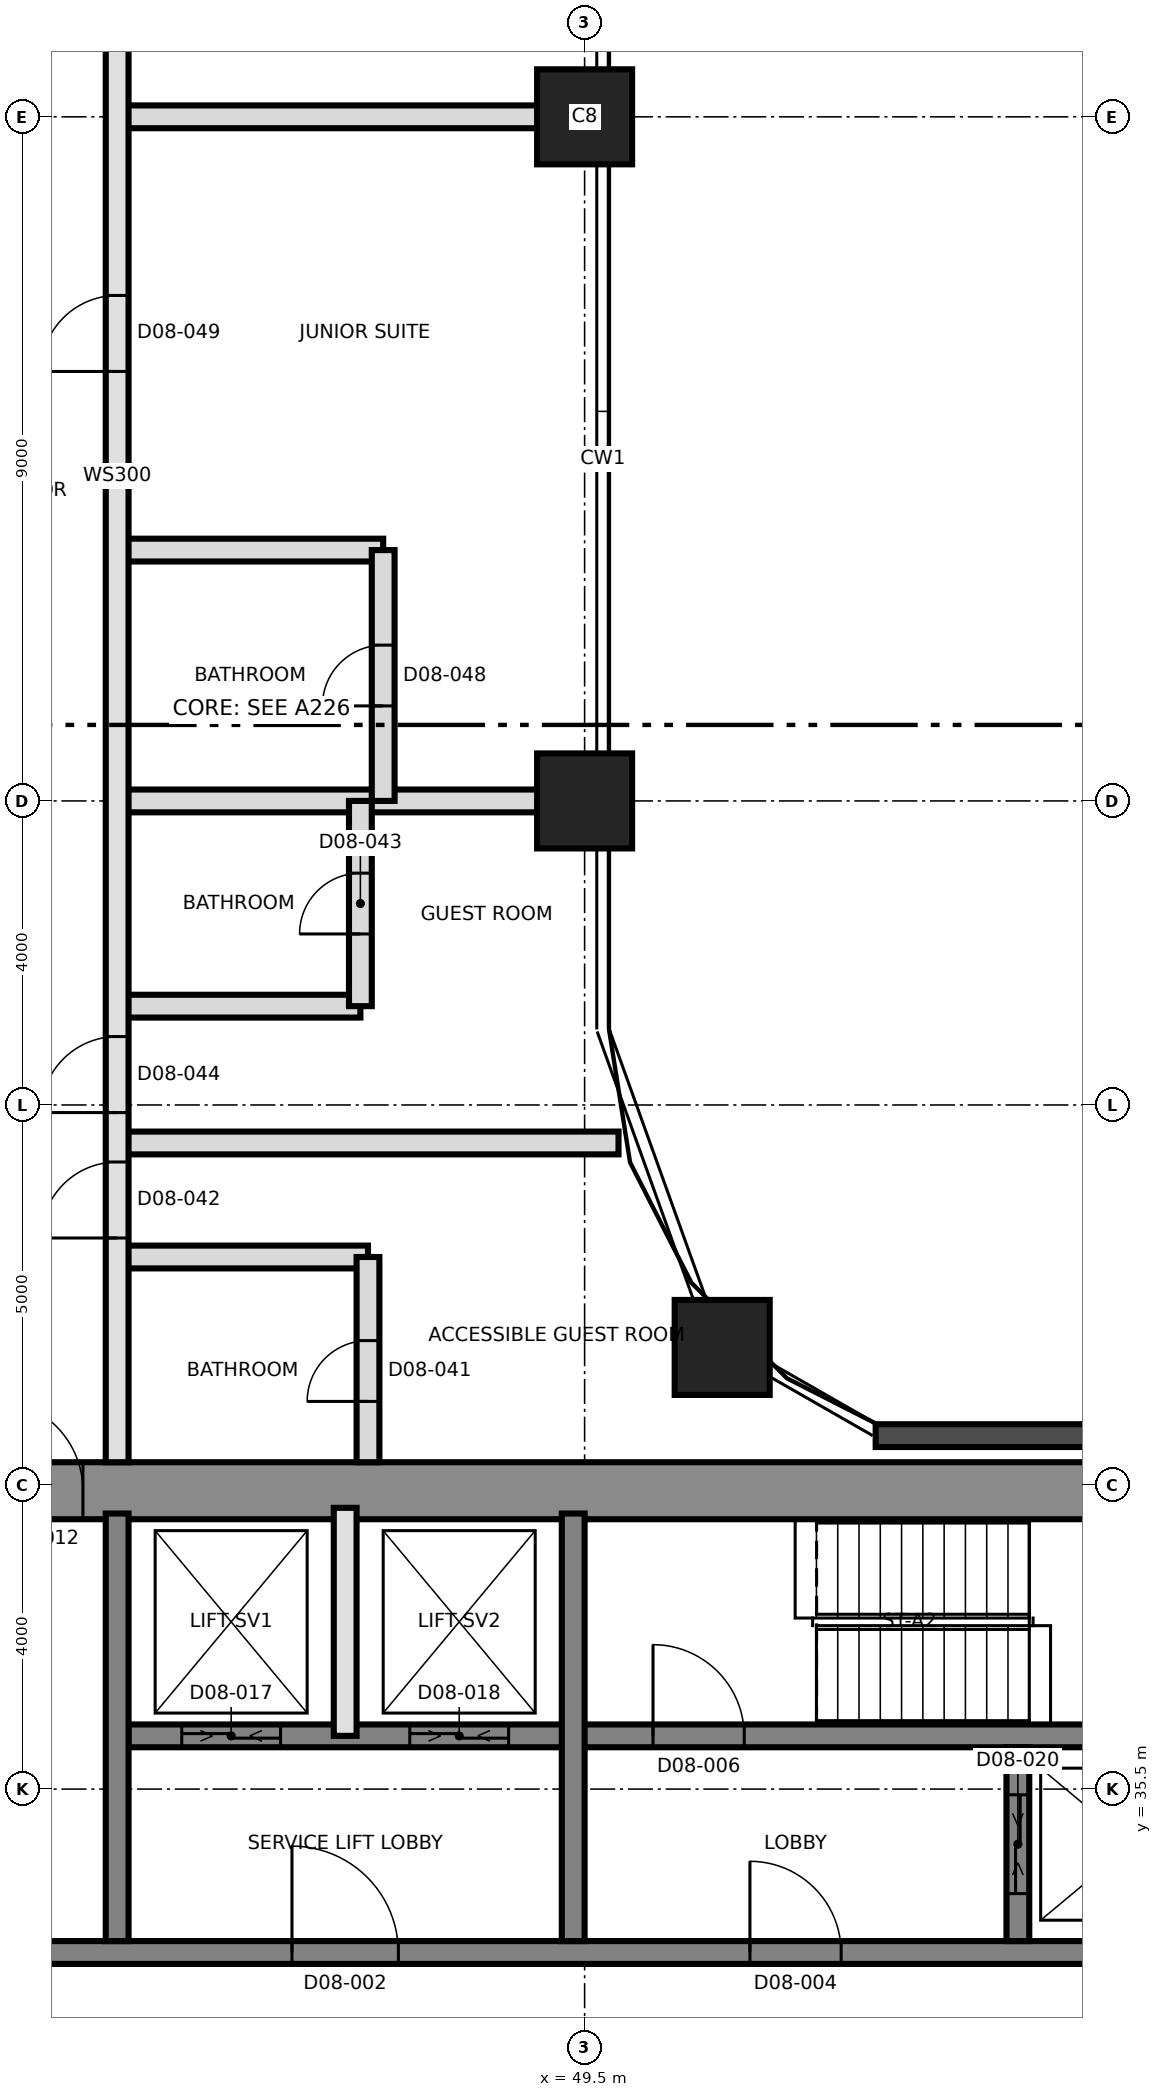
"""IFC4 building model, lengths in metres.
Left out: names, types, materials, properties, quantities, classifications, styles, units other than length and angle.
Written with IfcOpenShell. Run it as: python <this file> out.ifc"""

import sys

from ifc_helpers import new_model, si_unit, direction, frame, frame_2d, origin, origin_2d, place, context, subcontext, project, spatial, rectangle, extrude, element, fill, save


model = new_model("IFC4")
c1 = context("Model", 3, precision=1e-05, world=origin(), true_north=direction((0.0, 1.0)))
c2 = subcontext(c1, "Body", "Model", "MODEL_VIEW")
j1 = project(units=[si_unit("LENGTHUNIT", "METRE"), si_unit("PLANEANGLEUNIT", "RADIAN")], contexts=[c1])
p1 = place(None, origin())
s1 = spatial("IfcSite", under=j1, at=p1, CompositionType="ELEMENT")
p2 = place(p1, origin())
s2 = spatial("IfcBuilding", under=s1, at=p2, CompositionType="ELEMENT")
p3 = place(p2, frame((0.0, 0.0, 98.2)))
s3 = spatial("IfcBuildingStorey", under=s2, at=p3, CompositionType="ELEMENT", Elevation=98.2)
p4 = place(p3, frame((31.125, 39.425, 0.0), z_axis=(0.0, 0.0, 1.0), x_axis=(1.0, 0.0, 0.0)))
e1 = element("IfcWall", 1, at=p4, inside=s3, PredefinedType="SHEAR", context=c2, shape_type="SweptSolid", body=[
    extrude(rectangle(XDim=27.0, YDim=0.75, at=frame_2d((13.5, 0.0))), origin(), (0.0, 0.0, 1.0), 3.7),
])
p5 = place(p4, frame((10.575, 0.0, 0.0)))
e2 = element("IfcOpeningElement", 2, at=p5, cuts=e1, PredefinedType="OPENING", context=c2, shape_type="SweptSolid", body=[
    extrude(rectangle(XDim=1.2, YDim=2.1, at=frame_2d((0.6, 1.05))), frame((0.0, 0.385, 0.0), z_axis=(0.0, -1.0, 0.0), x_axis=(1.0, 0.0, 0.0)), (0.0, 0.0, 1.0), 0.77),
])
p6 = place(p3, frame((31.875, 33.35, 0.0), z_axis=(0.0, 0.0, 1.0), x_axis=(1.0, 0.0, 0.0)))
e3 = element("IfcWall", 3, at=p6, inside=s3, PredefinedType="SHEAR", context=c2, shape_type="SweptSolid", body=[
    extrude(rectangle(XDim=26.25, YDim=0.3, at=frame_2d((13.125, 0.0))), origin(), (0.0, 0.0, 1.0), 3.7),
])
p7 = place(p6, frame((13.775, 0.0, 0.0)))
e4 = element("IfcOpeningElement", 4, at=p7, cuts=e3, PredefinedType="OPENING", context=c2, shape_type="SweptSolid", body=[
    extrude(rectangle(XDim=1.4, YDim=2.1, at=frame_2d((0.7, 1.05))), frame((0.0, 0.16, 0.0), z_axis=(0.0, -1.0, 0.0), x_axis=(1.0, 0.0, 0.0)), (0.0, 0.0, 1.0), 0.32),
])
p8 = place(p6, frame((5.25, 0.0, 0.0)))
e5 = element("IfcOpeningElement", 5, at=p8, cuts=e3, PredefinedType="OPENING", context=c2, shape_type="SweptSolid", body=[
    extrude(rectangle(XDim=1.2, YDim=2.1, at=frame_2d((0.6, 1.05))), frame((0.0, 0.16, 0.0), z_axis=(0.0, -1.0, 0.0), x_axis=(1.0, 0.0, 0.0)), (0.0, 0.0, 1.0), 0.32),
])
p9 = place(p6, frame((19.8, 0.0, 0.0)))
e6 = element("IfcOpeningElement", 6, at=p9, cuts=e3, PredefinedType="OPENING", context=c2, shape_type="SweptSolid", body=[
    extrude(rectangle(XDim=1.2, YDim=2.1, at=frame_2d((0.6, 1.05))), frame((0.0, 0.16, 0.0), z_axis=(0.0, -1.0, 0.0), x_axis=(1.0, 0.0, 0.0)), (0.0, 0.0, 1.0), 0.32),
])
p10 = place(p3, frame((43.5, 36.2, 0.0), z_axis=(0.0, 0.0, 1.0), x_axis=(1.0, 0.0, 0.0)))
e7 = element("IfcWall", 7, at=p10, inside=s3, PredefinedType="SHEAR", context=c2, shape_type="SweptSolid", body=[
    extrude(rectangle(XDim=14.625, YDim=0.3, at=frame_2d((7.312, 0.0))), origin(), (0.0, 0.0, 1.0), 3.7),
])
p11 = place(p10, frame((6.9, 0.0, 0.0)))
e8 = element("IfcOpeningElement", 8, at=p11, cuts=e7, PredefinedType="OPENING", context=c2, shape_type="SweptSolid", body=[
    extrude(rectangle(XDim=1.2, YDim=2.1, at=frame_2d((0.6, 1.05))), frame((0.0, 0.16, 0.0), z_axis=(0.0, -1.0, 0.0), x_axis=(1.0, 0.0, 0.0)), (0.0, 0.0, 1.0), 0.32),
])
p12 = place(p10, frame((0.7, 0.0, 0.0)))
e9 = element("IfcOpeningElement", 9, at=p12, cuts=e7, PredefinedType="OPENING", context=c2, shape_type="SweptSolid", body=[
    extrude(rectangle(XDim=1.3, YDim=2.4, at=frame_2d((0.65, 1.2))), frame((0.0, 0.16, 0.0), z_axis=(0.0, -1.0, 0.0), x_axis=(1.0, 0.0, 0.0)), (0.0, 0.0, 1.0), 0.32),
])
p13 = place(p10, frame((3.7, 0.0, 0.0)))
e10 = element("IfcOpeningElement", 10, at=p13, cuts=e7, PredefinedType="OPENING", context=c2, shape_type="SweptSolid", body=[
    extrude(rectangle(XDim=1.3, YDim=2.4, at=frame_2d((0.65, 1.2))), frame((0.0, 0.16, 0.0), z_axis=(0.0, -1.0, 0.0), x_axis=(1.0, 0.0, 0.0)), (0.0, 0.0, 1.0), 0.32),
])
for number, where, z_axis, x_axis in (
    (11, (43.35, 33.5, 0.0), (0.0, 0.0, 1.0), (0.0, 1.0, 0.0)),
    (12, (49.35, 33.5, 0.0), (0.0, 0.0, 1.0), (0.0, 1.0, 0.0)),
):
    element("IfcWall", number, at=place(p3, frame(where, z_axis=z_axis, x_axis=x_axis)), inside=s3, PredefinedType="SHEAR", context=c2, shape_type="SweptSolid", body=[
        extrude(rectangle(XDim=5.625, YDim=0.3, at=frame_2d((2.812, 0.0))), origin(), (0.0, 0.0, 1.0), 3.7),
    ])
p14 = place(p3, frame((55.2, 33.5, 0.0), z_axis=(0.0, 0.0, 1.0), x_axis=(0.0, 1.0, 0.0)))
e13 = element("IfcWall", 13, at=p14, inside=s3, PredefinedType="SHEAR", context=c2, shape_type="SweptSolid", body=[
    extrude(rectangle(XDim=2.55, YDim=0.3, at=frame_2d((1.275, 0.0))), origin(), (0.0, 0.0, 1.0), 3.7),
])
p15 = place(p14, frame((0.625, 0.0, 0.0)))
e14 = element("IfcOpeningElement", 14, at=p15, cuts=e13, PredefinedType="OPENING", context=c2, shape_type="SweptSolid", body=[
    extrude(rectangle(XDim=1.3, YDim=2.4, at=frame_2d((0.65, 1.2))), frame((0.0, 0.16, 0.0), z_axis=(0.0, -1.0, 0.0), x_axis=(1.0, 0.0, 0.0)), (0.0, 0.0, 1.0), 0.32),
])
for number, where, z_axis, x_axis in (
    (15, (51.31, 41.31, 0.0), (0.0, 0.0, 1.0), (1.0, 0.0, 0.0)),
    (16, (49.5, 48.5, 0.0), (0.0, 0.0, 1.0), (1.0, 0.0, 0.0)),
    (17, (49.5, 57.5, 0.0), (0.0, 0.0, 1.0), (1.0, 0.0, 0.0)),
):
    element("IfcColumn", number, at=place(p3, frame(where, z_axis=z_axis, x_axis=x_axis)), inside=s3, PredefinedType="COLUMN", context=c2, shape_type="SweptSolid", body=[
        extrude(rectangle(XDim=1.25, YDim=1.25, at=origin_2d()), origin(), (0.0, 0.0, 1.0), 3.7),
    ])
p16 = place(p3, frame((58.67, 40.15, 0.0), z_axis=(0.0, 0.0, 1.0), x_axis=(-1.0, 0.0, 0.0)))
e18 = element("IfcWall", 18, at=p16, inside=s3, PredefinedType="SOLIDWALL", context=c2, shape_type="SweptSolid", body=[
    extrude(rectangle(XDim=5.341, YDim=0.3, at=frame_2d((2.67, 0.0))), origin(), (0.0, 0.0, 1.0), 3.4),
])
p17 = place(p3, frame((46.35, 36.2, 0.0), z_axis=(0.0, 0.0, 1.0), x_axis=(0.0, 1.0, 0.0)))
e19 = element("IfcWall", 19, at=p17, inside=s3, PredefinedType="SOLIDWALL", context=c2, shape_type="SweptSolid", body=[
    extrude(rectangle(XDim=3.0, YDim=0.3, at=frame_2d((1.5, 0.0))), origin(), (0.0, 0.0, 1.0), 3.4),
])
p18 = place(p3, frame((43.35, 42.5, 0.0), z_axis=(0.0, 0.0, 1.0), x_axis=(1.0, 0.0, 0.0)))
e20 = element("IfcWall", 20, at=p18, inside=s3, PredefinedType="PARTITIONING", context=c2, shape_type="SweptSolid", body=[
    extrude(rectangle(XDim=3.3, YDim=0.3, at=frame_2d((1.65, 0.0))), origin(), (0.0, 0.0, 1.0), 3.4),
])
p19 = place(p3, frame((43.35, 44.0, 0.0), z_axis=(0.0, 0.0, 1.0), x_axis=(1.0, 0.0, 0.0)))
e21 = element("IfcWall", 21, at=p19, inside=s3, PredefinedType="PARTITIONING", context=c2, shape_type="SweptSolid", body=[
    extrude(rectangle(XDim=6.596, YDim=0.3, at=frame_2d((3.298, 0.0))), origin(), (0.0, 0.0, 1.0), 3.4),
])
p20 = place(p3, frame((43.35, 45.8, 0.0), z_axis=(0.0, 0.0, 1.0), x_axis=(1.0, 0.0, 0.0)))
e22 = element("IfcWall", 22, at=p20, inside=s3, PredefinedType="PARTITIONING", context=c2, shape_type="SweptSolid", body=[
    extrude(rectangle(XDim=3.2, YDim=0.3, at=frame_2d((1.6, 0.0))), origin(), (0.0, 0.0, 1.0), 3.4),
])
p21 = place(p3, frame((43.35, 48.5, 0.0), z_axis=(0.0, 0.0, 1.0), x_axis=(1.0, 0.0, 0.0)))
e23 = element("IfcWall", 23, at=p21, inside=s3, PredefinedType="PARTITIONING", context=c2, shape_type="SweptSolid", body=[
    extrude(rectangle(XDim=6.12, YDim=0.3, at=frame_2d((3.06, 0.0))), origin(), (0.0, 0.0, 1.0), 3.4),
])
p22 = place(p3, frame((43.35, 51.8, 0.0), z_axis=(0.0, 0.0, 1.0), x_axis=(1.0, 0.0, 0.0)))
e24 = element("IfcWall", 24, at=p22, inside=s3, PredefinedType="PARTITIONING", context=c2, shape_type="SweptSolid", body=[
    extrude(rectangle(XDim=3.5, YDim=0.3, at=frame_2d((1.75, 0.0))), origin(), (0.0, 0.0, 1.0), 3.4),
])
p23 = place(p3, frame((43.35, 57.5, 0.0), z_axis=(0.0, 0.0, 1.0), x_axis=(1.0, 0.0, 0.0)))
e25 = element("IfcWall", 25, at=p23, inside=s3, PredefinedType="PARTITIONING", context=c2, shape_type="SweptSolid", body=[
    extrude(rectangle(XDim=6.12, YDim=0.3, at=frame_2d((3.06, 0.0))), origin(), (0.0, 0.0, 1.0), 3.4),
])
p24 = place(p3, frame((43.35, 39.8, 0.0), z_axis=(0.0, 0.0, 1.0), x_axis=(0.0, 1.0, 0.0)))
e26 = element("IfcWall", 26, at=p24, inside=s3, PredefinedType="SOLIDWALL", context=c2, shape_type="SweptSolid", body=[
    extrude(rectangle(XDim=25.95, YDim=0.3, at=frame_2d((12.975, 0.0))), origin(), (0.0, 0.0, 1.0), 3.4),
])
p25 = place(p24, frame((2.95, 0.0, 0.0)))
e27 = element("IfcOpeningElement", 27, at=p25, cuts=e26, PredefinedType="OPENING", context=c2, shape_type="SweptSolid", body=[
    extrude(rectangle(XDim=1.0, YDim=2.1, at=frame_2d((0.5, 1.05))), frame((0.0, 0.16, 0.0), z_axis=(0.0, -1.0, 0.0), x_axis=(1.0, 0.0, 0.0)), (0.0, 0.0, 1.0), 0.32),
])
p26 = place(p24, frame((4.6, 0.0, 0.0)))
e28 = element("IfcOpeningElement", 28, at=p26, cuts=e26, PredefinedType="OPENING", context=c2, shape_type="SweptSolid", body=[
    extrude(rectangle(XDim=1.0, YDim=2.1, at=frame_2d((0.5, 1.05))), frame((0.0, 0.16, 0.0), z_axis=(0.0, -1.0, 0.0), x_axis=(1.0, 0.0, 0.0)), (0.0, 0.0, 1.0), 0.32),
])
p27 = place(p24, frame((14.35, 0.0, 0.0)))
e29 = element("IfcOpeningElement", 29, at=p27, cuts=e26, PredefinedType="OPENING", context=c2, shape_type="SweptSolid", body=[
    extrude(rectangle(XDim=1.0, YDim=2.4, at=frame_2d((0.5, 1.2))), frame((0.0, 0.16, 0.0), z_axis=(0.0, -1.0, 0.0), x_axis=(1.0, 0.0, 0.0)), (0.0, 0.0, 1.0), 0.32),
])
p28 = place(p24, frame((19.7, 0.0, 0.0)))
e30 = element("IfcOpeningElement", 30, at=p28, cuts=e26, PredefinedType="OPENING", context=c2, shape_type="SweptSolid", body=[
    extrude(rectangle(XDim=1.0, YDim=2.4, at=frame_2d((0.5, 1.2))), frame((0.0, 0.16, 0.0), z_axis=(0.0, -1.0, 0.0), x_axis=(1.0, 0.0, 0.0)), (0.0, 0.0, 1.0), 0.32),
])
p29 = place(p3, frame((46.55, 45.8, 0.0), z_axis=(0.0, 0.0, 1.0), x_axis=(0.0, 1.0, 0.0)))
e31 = element("IfcWall", 31, at=p29, inside=s3, PredefinedType="PARTITIONING", context=c2, shape_type="SweptSolid", body=[
    extrude(rectangle(XDim=2.7, YDim=0.3, at=frame_2d((1.35, 0.0))), origin(), (0.0, 0.0, 1.0), 3.4),
])
p30 = place(p29, frame((0.95, 0.0, 0.0)))
e32 = element("IfcOpeningElement", 32, at=p30, cuts=e31, PredefinedType="OPENING", context=c2, shape_type="SweptSolid", body=[
    extrude(rectangle(XDim=0.8, YDim=2.1, at=frame_2d((0.4, 1.05))), frame((0.0, 0.16, 0.0), z_axis=(0.0, -1.0, 0.0), x_axis=(1.0, 0.0, 0.0)), (0.0, 0.0, 1.0), 0.32),
])
p31 = place(p3, frame((46.65, 39.8, 0.0), z_axis=(0.0, 0.0, 1.0), x_axis=(0.0, 1.0, 0.0)))
e33 = element("IfcWall", 33, at=p31, inside=s3, PredefinedType="PARTITIONING", context=c2, shape_type="SweptSolid", body=[
    extrude(rectangle(XDim=2.7, YDim=0.3, at=frame_2d((1.35, 0.0))), origin(), (0.0, 0.0, 1.0), 3.4),
])
p32 = place(p31, frame((0.8, 0.0, 0.0)))
e34 = element("IfcOpeningElement", 34, at=p32, cuts=e33, PredefinedType="OPENING", context=c2, shape_type="SweptSolid", body=[
    extrude(rectangle(XDim=0.8, YDim=2.1, at=frame_2d((0.4, 1.05))), frame((0.0, 0.16, 0.0), z_axis=(0.0, -1.0, 0.0), x_axis=(1.0, 0.0, 0.0)), (0.0, 0.0, 1.0), 0.32),
])
p33 = place(p3, frame((46.85, 48.5, 0.0), z_axis=(0.0, 0.0, 1.0), x_axis=(0.0, 1.0, 0.0)))
e35 = element("IfcWall", 35, at=p33, inside=s3, PredefinedType="PARTITIONING", context=c2, shape_type="SweptSolid", body=[
    extrude(rectangle(XDim=3.3, YDim=0.3, at=frame_2d((1.65, 0.0))), origin(), (0.0, 0.0, 1.0), 3.4),
])
p34 = place(p33, frame((1.25, 0.0, 0.0)))
e36 = element("IfcOpeningElement", 36, at=p34, cuts=e35, PredefinedType="OPENING", context=c2, shape_type="SweptSolid", body=[
    extrude(rectangle(XDim=0.8, YDim=2.1, at=frame_2d((0.4, 1.05))), frame((0.0, 0.16, 0.0), z_axis=(0.0, -1.0, 0.0), x_axis=(1.0, 0.0, 0.0)), (0.0, 0.0, 1.0), 0.32),
])
p35 = place(p7, origin())
e37 = element("IfcDoor", 37, at=p35, inside=s3, OperationType="SINGLE_SWING_RIGHT", PredefinedType="DOOR", context=c2, shape_type="SweptSolid", body=[
    extrude(rectangle(XDim=1.4, YDim=2.1, at=frame_2d((0.7, 1.05))), frame((0.0, 0.025, 0.0), z_axis=(0.0, -1.0, 0.0), x_axis=(1.0, 0.0, 0.0)), (0.0, 0.0, 1.0), 0.05),
])
fill(e4, e37)
p36 = place(p9, origin())
e38 = element("IfcDoor", 38, at=p36, inside=s3, OperationType="SINGLE_SWING_RIGHT", PredefinedType="DOOR", context=c2, shape_type="SweptSolid", body=[
    extrude(rectangle(XDim=1.2, YDim=2.1, at=frame_2d((0.6, 1.05))), frame((0.0, 0.025, 0.0), z_axis=(0.0, -1.0, 0.0), x_axis=(1.0, 0.0, 0.0)), (0.0, 0.0, 1.0), 0.05),
])
fill(e6, e38)
p37 = place(p11, origin())
e39 = element("IfcDoor", 39, at=p37, inside=s3, OperationType="SINGLE_SWING_LEFT", PredefinedType="DOOR", context=c2, shape_type="SweptSolid", body=[
    extrude(rectangle(XDim=1.2, YDim=2.1, at=frame_2d((0.6, 1.05))), frame((0.0, 0.025, 0.0), z_axis=(0.0, -1.0, 0.0), x_axis=(1.0, 0.0, 0.0)), (0.0, 0.0, 1.0), 0.05),
])
fill(e8, e39)
p38 = place(p5, origin())
e40 = element("IfcDoor", 40, at=p38, inside=s3, OperationType="SINGLE_SWING_RIGHT", PredefinedType="DOOR", context=c2, shape_type="SweptSolid", body=[
    extrude(rectangle(XDim=1.2, YDim=2.1, at=frame_2d((0.6, 1.05))), frame((0.0, 0.025, 0.0), z_axis=(0.0, -1.0, 0.0), x_axis=(1.0, 0.0, 0.0)), (0.0, 0.0, 1.0), 0.05),
])
fill(e2, e40)
p39 = place(p12, origin())
e41 = element("IfcDoor", 41, at=p39, inside=s3, OperationType="SLIDING_TO_LEFT", PredefinedType="DOOR", context=c2, shape_type="SweptSolid", body=[
    extrude(rectangle(XDim=1.3, YDim=2.4, at=frame_2d((0.65, 1.2))), frame((0.0, 0.025, 0.0), z_axis=(0.0, -1.0, 0.0), x_axis=(1.0, 0.0, 0.0)), (0.0, 0.0, 1.0), 0.05),
])
fill(e9, e41)
p40 = place(p13, origin())
e42 = element("IfcDoor", 42, at=p40, inside=s3, OperationType="SLIDING_TO_LEFT", PredefinedType="DOOR", context=c2, shape_type="SweptSolid", body=[
    extrude(rectangle(XDim=1.3, YDim=2.4, at=frame_2d((0.65, 1.2))), frame((0.0, 0.025, 0.0), z_axis=(0.0, -1.0, 0.0), x_axis=(1.0, 0.0, 0.0)), (0.0, 0.0, 1.0), 0.05),
])
fill(e10, e42)
p41 = place(p15, origin())
e43 = element("IfcDoor", 43, at=p41, inside=s3, OperationType="SLIDING_TO_LEFT", PredefinedType="DOOR", context=c2, shape_type="SweptSolid", body=[
    extrude(rectangle(XDim=1.3, YDim=2.4, at=frame_2d((0.65, 1.2))), frame((0.0, 0.025, 0.0), z_axis=(0.0, -1.0, 0.0), x_axis=(1.0, 0.0, 0.0)), (0.0, 0.0, 1.0), 0.05),
])
fill(e14, e43)
p42 = place(p32, origin())
e44 = element("IfcDoor", 44, at=p42, inside=s3, OperationType="SINGLE_SWING_RIGHT", PredefinedType="DOOR", context=c2, shape_type="SweptSolid", body=[
    extrude(rectangle(XDim=0.8, YDim=2.1, at=frame_2d((0.4, 1.05))), frame((0.0, 0.025, 0.0), z_axis=(0.0, -1.0, 0.0), x_axis=(1.0, 0.0, 0.0)), (0.0, 0.0, 1.0), 0.05),
])
fill(e34, e44)
p43 = place(p25, origin())
e45 = element("IfcDoor", 45, at=p43, inside=s3, OperationType="SINGLE_SWING_LEFT", PredefinedType="DOOR", context=c2, shape_type="SweptSolid", body=[
    extrude(rectangle(XDim=1.0, YDim=2.1, at=frame_2d((0.5, 1.05))), frame((0.0, 0.025, 0.0), z_axis=(0.0, -1.0, 0.0), x_axis=(1.0, 0.0, 0.0)), (0.0, 0.0, 1.0), 0.05),
])
fill(e27, e45)
p44 = place(p30, origin())
e46 = element("IfcDoor", 46, at=p44, inside=s3, OperationType="SINGLE_SWING_LEFT", PredefinedType="DOOR", context=c2, shape_type="SweptSolid", body=[
    extrude(rectangle(XDim=0.8, YDim=2.1, at=frame_2d((0.4, 1.05))), frame((0.0, 0.025, 0.0), z_axis=(0.0, -1.0, 0.0), x_axis=(1.0, 0.0, 0.0)), (0.0, 0.0, 1.0), 0.05),
])
fill(e32, e46)
p45 = place(p26, origin())
e47 = element("IfcDoor", 47, at=p45, inside=s3, OperationType="SINGLE_SWING_LEFT", PredefinedType="DOOR", context=c2, shape_type="SweptSolid", body=[
    extrude(rectangle(XDim=1.0, YDim=2.1, at=frame_2d((0.5, 1.05))), frame((0.0, 0.025, 0.0), z_axis=(0.0, -1.0, 0.0), x_axis=(1.0, 0.0, 0.0)), (0.0, 0.0, 1.0), 0.05),
])
fill(e28, e47)
p46 = place(p34, origin())
e48 = element("IfcDoor", 48, at=p46, inside=s3, OperationType="SINGLE_SWING_LEFT", PredefinedType="DOOR", context=c2, shape_type="SweptSolid", body=[
    extrude(rectangle(XDim=0.8, YDim=2.1, at=frame_2d((0.4, 1.05))), frame((0.0, 0.025, 0.0), z_axis=(0.0, -1.0, 0.0), x_axis=(1.0, 0.0, 0.0)), (0.0, 0.0, 1.0), 0.05),
])
fill(e36, e48)
p47 = place(p27, origin())
e49 = element("IfcDoor", 49, at=p47, inside=s3, OperationType="SINGLE_SWING_RIGHT", PredefinedType="DOOR", context=c2, shape_type="SweptSolid", body=[
    extrude(rectangle(XDim=1.0, YDim=2.4, at=frame_2d((0.5, 1.2))), frame((0.0, 0.025, 0.0), z_axis=(0.0, -1.0, 0.0), x_axis=(1.0, 0.0, 0.0)), (0.0, 0.0, 1.0), 0.05),
])
fill(e29, e49)
save(model, sys.argv[1])
